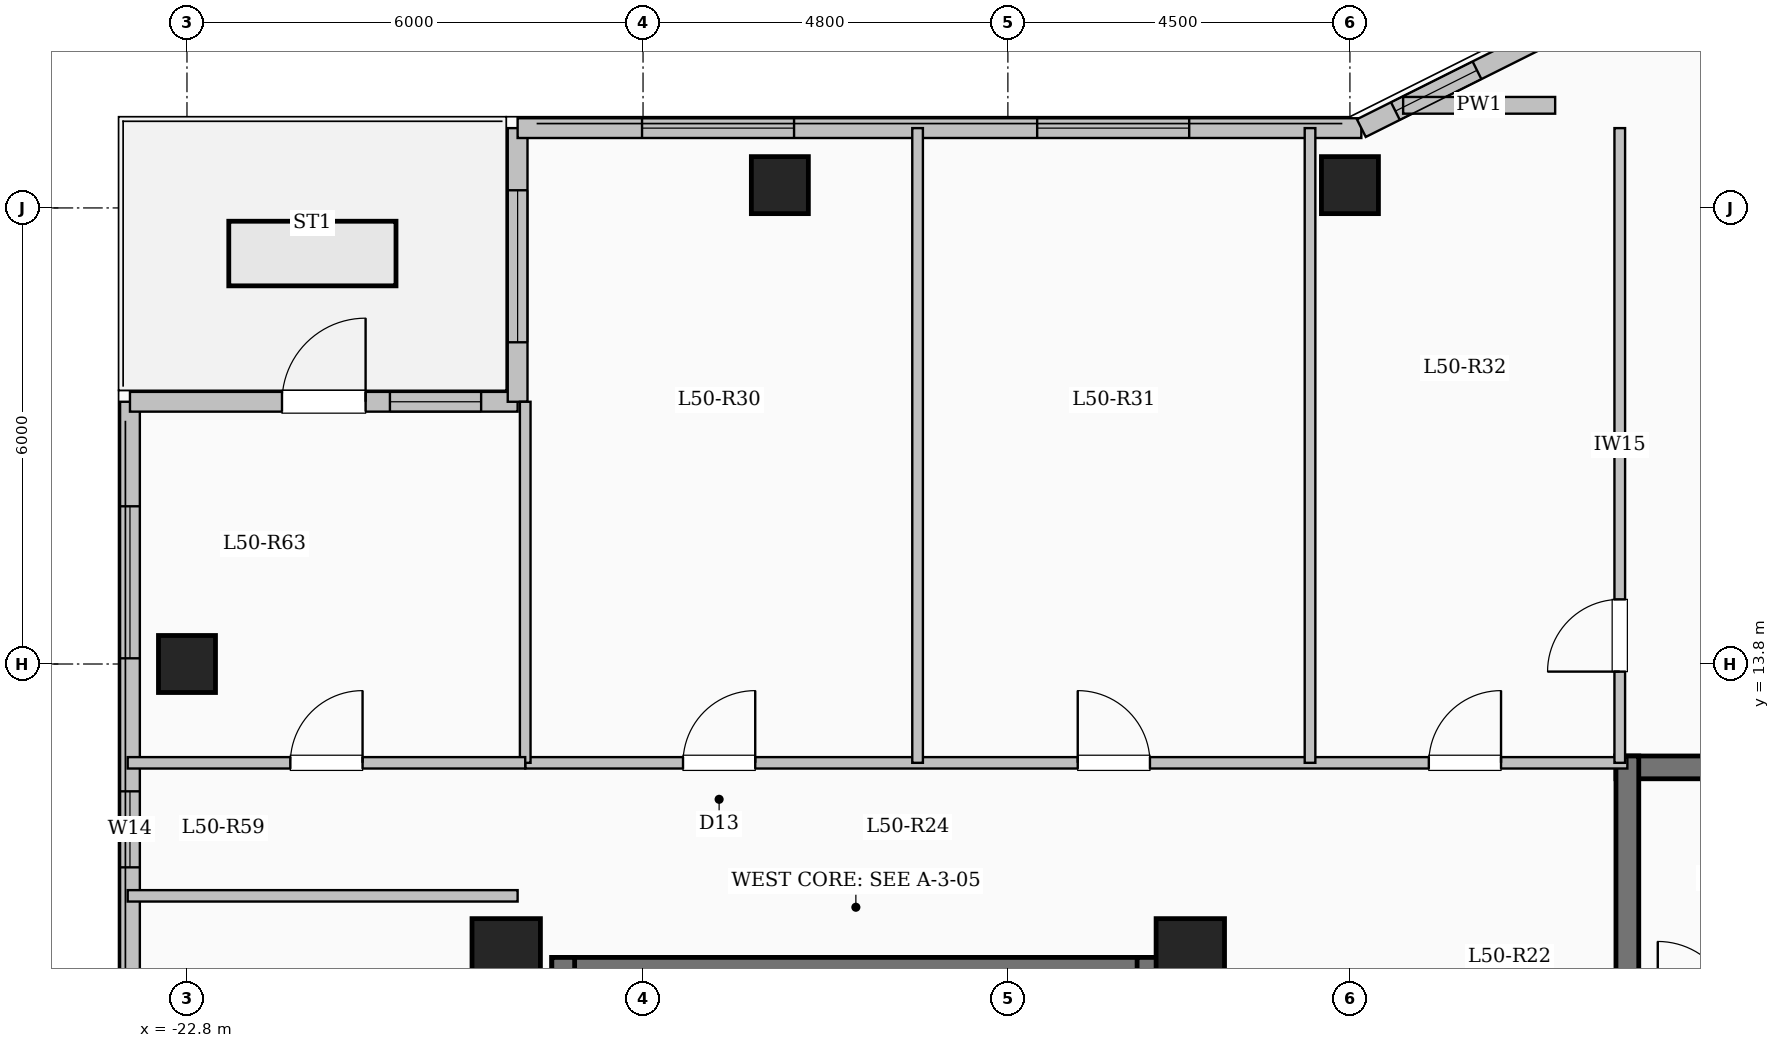
"""IFC4 building model, lengths in metres.
Left out: names, types, materials, properties, quantities, classifications, styles, units other than length and angle.
Written with IfcOpenShell. Run it as: python <this file> out.ifc"""

import sys

from ifc_helpers import new_model, si_unit, direction, frame, frame_2d, origin, origin_2d, place, context, subcontext, project, spatial, rectangle, extrude, element, fill, save


model = new_model("IFC4")
c1 = context("Model", 3, precision=1e-05, world=origin(), true_north=direction((0.0, 1.0)))
c2 = subcontext(c1, "Body", "Model", "MODEL_VIEW")
j1 = project(units=[si_unit("LENGTHUNIT", "METRE"), si_unit("PLANEANGLEUNIT", "RADIAN")], contexts=[c1])
p1 = place(None, origin())
s1 = spatial("IfcSite", under=j1, at=p1, CompositionType="ELEMENT")
p2 = place(p1, origin())
s2 = spatial("IfcBuilding", under=s1, at=p2, CompositionType="ELEMENT")
p3 = place(p2, frame((0.0, 0.0, 186.9)))
s3 = spatial("IfcBuildingStorey", under=s2, at=p3, CompositionType="ELEMENT", Elevation=186.9)
for number, where, z_axis, x_axis in (
    (1, (-9.6, 10.0, 0.0), (0.0, 0.0, 1.0), (1.0, 0.0, 0.0)),
    (2, (-18.6, 10.0, 0.0), (0.0, 0.0, 1.0), (1.0, 0.0, 0.0)),
):
    element("IfcColumn", number, at=place(p3, frame(where, z_axis=z_axis, x_axis=x_axis)), inside=s3, PredefinedType="COLUMN", context=c2, shape_type="SweptSolid", body=[
        extrude(rectangle(XDim=0.9, YDim=0.9, at=origin_2d()), origin(), (0.0, 0.0, 1.0), 3.35),
    ])
for number, where, z_axis, x_axis in (
    (3, (-15.0, 20.1, 0.0), (0.0, 0.0, 1.0), (1.0, 0.0, 0.0)),
    (4, (-7.5, 20.1, 0.0), (0.0, 0.0, 1.0), (1.0, 0.0, 0.0)),
    (5, (-22.8, 13.8, 0.0), (0.0, 0.0, 1.0), (1.0, 0.0, 0.0)),
):
    element("IfcColumn", number, at=place(p3, frame(where, z_axis=z_axis, x_axis=x_axis)), inside=s3, PredefinedType="COLUMN", context=c2, shape_type="SweptSolid", body=[
        extrude(rectangle(XDim=0.75, YDim=0.75, at=origin_2d()), origin(), (0.0, 0.0, 1.0), 3.35),
    ])
p4 = place(p3, frame((-23.55, -17.25, 0.0), z_axis=(0.0, 0.0, 1.0), x_axis=(0.0, 1.0, 0.0)))
e6 = element("IfcWall", 6, at=p4, inside=s3, PredefinedType="SOLIDWALL", context=c2, shape_type="SweptSolid", body=[
    extrude(rectangle(XDim=34.5, YDim=0.26, at=frame_2d((17.25, 0.0))), origin(), (0.0, 0.0, 1.0), 3.1),
])
p5 = place(p4, frame((2.825, 0.0, 0.9)))
e7 = element("IfcOpeningElement", 7, at=p5, cuts=e6, PredefinedType="OPENING", context=c2, shape_type="SweptSolid", body=[
    extrude(rectangle(XDim=2.2, YDim=1.75, at=frame_2d((1.1, 0.875))), frame((0.0, 0.14, 0.0), z_axis=(0.0, -1.0, 0.0), x_axis=(1.0, 0.0, 0.0)), (0.0, 0.0, 1.0), 0.28),
])
p6 = place(p4, frame((8.325, 0.0, 0.95)))
e8 = element("IfcOpeningElement", 8, at=p6, cuts=e6, PredefinedType="OPENING", context=c2, shape_type="SweptSolid", body=[
    extrude(rectangle(XDim=1.2, YDim=1.5, at=frame_2d((0.6, 0.75))), frame((0.0, 0.14, 0.0), z_axis=(0.0, -1.0, 0.0), x_axis=(1.0, 0.0, 0.0)), (0.0, 0.0, 1.0), 0.28),
])
p7 = place(p4, frame((18.0, 0.0, 0.9)))
e9 = element("IfcOpeningElement", 9, at=p7, cuts=e6, PredefinedType="OPENING", context=c2, shape_type="SweptSolid", body=[
    extrude(rectangle(XDim=2.0, YDim=1.7, at=frame_2d((1.0, 0.85))), frame((0.0, 0.14, 0.0), z_axis=(0.0, -1.0, 0.0), x_axis=(1.0, 0.0, 0.0)), (0.0, 0.0, 1.0), 0.28),
])
p8 = place(p4, frame((28.375, 0.0, 0.95)))
e10 = element("IfcOpeningElement", 10, at=p8, cuts=e6, PredefinedType="OPENING", context=c2, shape_type="SweptSolid", body=[
    extrude(rectangle(XDim=1.0, YDim=1.5, at=frame_2d((0.5, 0.75))), frame((0.0, 0.14, 0.0), z_axis=(0.0, -1.0, 0.0), x_axis=(1.0, 0.0, 0.0)), (0.0, 0.0, 1.0), 0.28),
])
p9 = place(p4, frame((31.125, 0.0, 0.9)))
e11 = element("IfcOpeningElement", 11, at=p9, cuts=e6, PredefinedType="OPENING", context=c2, shape_type="SweptSolid", body=[
    extrude(rectangle(XDim=2.0, YDim=1.7, at=frame_2d((1.0, 0.85))), frame((0.0, 0.14, 0.0), z_axis=(0.0, -1.0, 0.0), x_axis=(1.0, 0.0, 0.0)), (0.0, 0.0, 1.0), 0.28),
])
p10 = place(p3, frame((-23.55, 17.25, 0.0), z_axis=(0.0, 0.0, 1.0), x_axis=(1.0, 0.0, 0.0)))
e12 = element("IfcWall", 12, at=p10, inside=s3, PredefinedType="SOLIDWALL", context=c2, shape_type="SweptSolid", body=[
    extrude(rectangle(XDim=5.1, YDim=0.26, at=frame_2d((2.55, 0.0))), origin(), (0.0, 0.0, 1.0), 3.1),
])
p11 = place(p10, frame((2.0, 0.0, 0.0)))
e13 = element("IfcOpeningElement", 13, at=p11, cuts=e12, PredefinedType="OPENING", context=c2, shape_type="SweptSolid", body=[
    extrude(rectangle(XDim=1.1, YDim=2.2, at=frame_2d((0.55, 1.1))), frame((0.0, 0.14, 0.0), z_axis=(0.0, -1.0, 0.0), x_axis=(1.0, 0.0, 0.0)), (0.0, 0.0, 1.0), 0.28),
])
p12 = place(p10, frame((3.42, 0.0, 0.95)))
e14 = element("IfcOpeningElement", 14, at=p12, cuts=e12, PredefinedType="OPENING", context=c2, shape_type="SweptSolid", body=[
    extrude(rectangle(XDim=1.2, YDim=1.5, at=frame_2d((0.6, 0.75))), frame((0.0, 0.14, 0.0), z_axis=(0.0, -1.0, 0.0), x_axis=(1.0, 0.0, 0.0)), (0.0, 0.0, 1.0), 0.28),
])
p13 = place(p3, frame((-18.45, 17.25, 0.0), z_axis=(0.0, 0.0, 1.0), x_axis=(0.0, 1.0, 0.0)))
e15 = element("IfcWall", 15, at=p13, inside=s3, PredefinedType="SOLIDWALL", context=c2, shape_type="SweptSolid", body=[
    extrude(rectangle(XDim=3.6, YDim=0.26, at=frame_2d((1.8, 0.0))), origin(), (0.0, 0.0, 1.0), 3.1),
])
p14 = place(p13, frame((0.782, 0.0, 0.9)))
e16 = element("IfcOpeningElement", 16, at=p14, cuts=e15, PredefinedType="OPENING", context=c2, shape_type="SweptSolid", body=[
    extrude(rectangle(XDim=2.0, YDim=1.7, at=frame_2d((1.0, 0.85))), frame((0.0, 0.14, 0.0), z_axis=(0.0, -1.0, 0.0), x_axis=(1.0, 0.0, 0.0)), (0.0, 0.0, 1.0), 0.28),
])
p15 = place(p3, frame((-18.45, 20.85, 0.0), z_axis=(0.0, 0.0, 1.0), x_axis=(1.0, 0.0, 0.0)))
e17 = element("IfcWall", 17, at=p15, inside=s3, PredefinedType="SOLIDWALL", context=c2, shape_type="SweptSolid", body=[
    extrude(rectangle(XDim=11.1, YDim=0.26, at=frame_2d((5.55, 0.0))), origin(), (0.0, 0.0, 1.0), 3.1),
])
p16 = place(p15, frame((1.637, 0.0, 0.9)))
e18 = element("IfcOpeningElement", 18, at=p16, cuts=e17, PredefinedType="OPENING", context=c2, shape_type="SweptSolid", body=[
    extrude(rectangle(XDim=2.0, YDim=1.7, at=frame_2d((1.0, 0.85))), frame((0.0, 0.14, 0.0), z_axis=(0.0, -1.0, 0.0), x_axis=(1.0, 0.0, 0.0)), (0.0, 0.0, 1.0), 0.28),
])
p17 = place(p15, frame((6.835, 0.0, 0.9)))
e19 = element("IfcOpeningElement", 19, at=p17, cuts=e17, PredefinedType="OPENING", context=c2, shape_type="SweptSolid", body=[
    extrude(rectangle(XDim=2.0, YDim=1.7, at=frame_2d((1.0, 0.85))), frame((0.0, 0.14, 0.0), z_axis=(0.0, -1.0, 0.0), x_axis=(1.0, 0.0, 0.0)), (0.0, 0.0, 1.0), 0.28),
])
p18 = place(p3, frame((-7.35, 20.85, 0.0), z_axis=(0.0, 0.0, 1.0), x_axis=(0.894427191, 0.4472135955, 0.0)))
e20 = element("IfcWall", 20, at=p18, inside=s3, PredefinedType="SOLIDWALL", context=c2, shape_type="SweptSolid", body=[
    extrude(rectangle(XDim=3.354, YDim=0.26, at=frame_2d((1.677, 0.0))), origin(), (0.0, 0.0, 1.0), 3.1),
])
p19 = place(p18, frame((0.501, 0.0, 0.95)))
e21 = element("IfcOpeningElement", 21, at=p19, cuts=e20, PredefinedType="OPENING", context=c2, shape_type="SweptSolid", body=[
    extrude(rectangle(XDim=1.2, YDim=1.5, at=frame_2d((0.6, 0.75))), frame((0.0, 0.14, 0.0), z_axis=(0.0, -1.0, 0.0), x_axis=(1.0, 0.0, 0.0)), (0.0, 0.0, 1.0), 0.28),
])
p20 = place(p3, frame((-6.8, 21.15, 0.0), z_axis=(0.0, 0.0, 1.0), x_axis=(1.0, 0.0, 0.0)))
e22 = element("IfcWall", 22, at=p20, inside=s3, PredefinedType="PARAPET", context=c2, shape_type="SweptSolid", body=[
    extrude(rectangle(XDim=2.0, YDim=0.22, at=frame_2d((1.0, 0.0))), origin(), (0.0, 0.0, 1.0), 0.85),
])
p21 = place(p3, frame((-18.0, 9.79, 0.0), z_axis=(0.0, 0.0, 1.0), x_axis=(1.0, 0.0, 0.0)))
e23 = element("IfcWall", 23, at=p21, inside=s3, PredefinedType="SHEAR", context=c2, shape_type="SweptSolid", body=[
    extrude(rectangle(XDim=8.0, YDim=0.3, at=frame_2d((4.0, 0.0))), origin(), (0.0, 0.0, 1.0), 3.35),
])
for number, where, z_axis, x_axis in (
    (24, (-17.85, 6.35, 0.0), (0.0, 0.0, 1.0), (0.0, 1.0, 0.0)),
    (25, (-10.15, 6.35, 0.0), (0.0, 0.0, 1.0), (0.0, 1.0, 0.0)),
):
    element("IfcWall", number, at=place(p3, frame(where, z_axis=z_axis, x_axis=x_axis)), inside=s3, PredefinedType="SHEAR", context=c2, shape_type="SweptSolid", body=[
        extrude(rectangle(XDim=3.59, YDim=0.3, at=frame_2d((1.795, 0.0))), origin(), (0.0, 0.0, 1.0), 3.35),
    ])
p22 = place(p3, frame((-4.0, 12.44, 0.0), z_axis=(0.0, 0.0, 1.0), x_axis=(1.0, 0.0, 0.0)))
e26 = element("IfcWall", 26, at=p22, inside=s3, PredefinedType="SHEAR", context=c2, shape_type="SweptSolid", body=[
    extrude(rectangle(XDim=8.0, YDim=0.3, at=frame_2d((4.0, 0.0))), origin(), (0.0, 0.0, 1.0), 3.35),
])
p23 = place(p3, frame((-3.85, 9.0, 0.0), z_axis=(0.0, 0.0, 1.0), x_axis=(0.0, 1.0, 0.0)))
e27 = element("IfcWall", 27, at=p23, inside=s3, PredefinedType="SHEAR", context=c2, shape_type="SweptSolid", body=[
    extrude(rectangle(XDim=3.59, YDim=0.3, at=frame_2d((1.795, 0.0))), origin(), (0.0, 0.0, 1.0), 3.35),
])
p24 = place(p3, frame((-18.35, 12.5, 0.0), z_axis=(0.0, 0.0, 1.0), x_axis=(1.0, 0.0, 0.0)))
e28 = element("IfcWall", 28, at=p24, inside=s3, PredefinedType="PARTITIONING", context=c2, shape_type="SweptSolid", body=[
    extrude(rectangle(XDim=14.5, YDim=0.15, at=frame_2d((7.25, 0.0))), origin(), (0.0, 0.0, 1.0), 3.1),
])
p25 = place(p24, frame((2.076, 0.0, 0.0)))
e29 = element("IfcOpeningElement", 29, at=p25, cuts=e28, PredefinedType="OPENING", context=c2, shape_type="SweptSolid", body=[
    extrude(rectangle(XDim=0.95, YDim=2.15, at=frame_2d((0.475, 1.075))), frame((0.0, 0.085, 0.0), z_axis=(0.0, -1.0, 0.0), x_axis=(1.0, 0.0, 0.0)), (0.0, 0.0, 1.0), 0.17),
])
p26 = place(p24, frame((7.269, 0.0, 0.0)))
e30 = element("IfcOpeningElement", 30, at=p26, cuts=e28, PredefinedType="OPENING", context=c2, shape_type="SweptSolid", body=[
    extrude(rectangle(XDim=0.95, YDim=2.15, at=frame_2d((0.475, 1.075))), frame((0.0, 0.085, 0.0), z_axis=(0.0, -1.0, 0.0), x_axis=(1.0, 0.0, 0.0)), (0.0, 0.0, 1.0), 0.17),
])
p27 = place(p24, frame((11.888, 0.0, 0.0)))
e31 = element("IfcOpeningElement", 31, at=p27, cuts=e28, PredefinedType="OPENING", context=c2, shape_type="SweptSolid", body=[
    extrude(rectangle(XDim=0.95, YDim=2.15, at=frame_2d((0.475, 1.075))), frame((0.0, 0.085, 0.0), z_axis=(0.0, -1.0, 0.0), x_axis=(1.0, 0.0, 0.0)), (0.0, 0.0, 1.0), 0.17),
])
p28 = place(p3, frame((-3.95, 12.5, 0.0), z_axis=(0.0, 0.0, 1.0), x_axis=(0.0, 1.0, 0.0)))
e32 = element("IfcWall", 32, at=p28, inside=s3, PredefinedType="PARTITIONING", context=c2, shape_type="SweptSolid", body=[
    extrude(rectangle(XDim=8.35, YDim=0.14, at=frame_2d((4.175, 0.0))), origin(), (0.0, 0.0, 1.0), 3.1),
])
p29 = place(p28, frame((1.2, 0.0, 0.0)))
e33 = element("IfcOpeningElement", 33, at=p29, cuts=e32, PredefinedType="OPENING", context=c2, shape_type="SweptSolid", body=[
    extrude(rectangle(XDim=0.95, YDim=2.15, at=frame_2d((0.475, 1.075))), frame((0.0, 0.08, 0.0), z_axis=(0.0, -1.0, 0.0), x_axis=(1.0, 0.0, 0.0)), (0.0, 0.0, 1.0), 0.16),
])
p30 = place(p3, frame((-13.188, 12.5, 0.0), z_axis=(0.0, 0.0, 1.0), x_axis=(0.0, 1.0, 0.0)))
e34 = element("IfcWall", 34, at=p30, inside=s3, PredefinedType="PARTITIONING", context=c2, shape_type="SweptSolid", body=[
    extrude(rectangle(XDim=8.35, YDim=0.14, at=frame_2d((4.175, 0.0))), origin(), (0.0, 0.0, 1.0), 3.1),
])
p31 = place(p3, frame((-8.025, 12.5, 0.0), z_axis=(0.0, 0.0, 1.0), x_axis=(0.0, 1.0, 0.0)))
e35 = element("IfcWall", 35, at=p31, inside=s3, PredefinedType="PARTITIONING", context=c2, shape_type="SweptSolid", body=[
    extrude(rectangle(XDim=8.35, YDim=0.14, at=frame_2d((4.175, 0.0))), origin(), (0.0, 0.0, 1.0), 2.585),
])
p32 = place(p3, frame((-23.58, 10.75, 0.0), z_axis=(0.0, 0.0, 1.0), x_axis=(1.0, 0.0, 0.0)))
e36 = element("IfcWall", 36, at=p32, inside=s3, PredefinedType="PARTITIONING", context=c2, shape_type="SweptSolid", body=[
    extrude(rectangle(XDim=5.13, YDim=0.15, at=frame_2d((2.565, 0.0))), origin(), (0.0, 0.0, 1.0), 3.1),
])
p33 = place(p3, frame((-18.35, 12.5, 0.0), z_axis=(0.0, 0.0, 1.0), x_axis=(0.0, 1.0, 0.0)))
e37 = element("IfcWall", 37, at=p33, inside=s3, PredefinedType="PARTITIONING", context=c2, shape_type="SweptSolid", body=[
    extrude(rectangle(XDim=4.75, YDim=0.14, at=frame_2d((2.375, 0.0))), origin(), (0.0, 0.0, 1.0), 3.1),
])
p34 = place(p3, frame((-23.58, 12.5, 0.0), z_axis=(0.0, 0.0, 1.0), x_axis=(1.0, 0.0, 0.0)))
e38 = element("IfcWall", 38, at=p34, inside=s3, PredefinedType="PARTITIONING", context=c2, shape_type="SweptSolid", body=[
    extrude(rectangle(XDim=5.23, YDim=0.15, at=frame_2d((2.615, 0.0))), origin(), (0.0, 0.0, 1.0), 3.1),
])
p35 = place(p34, frame((2.14, 0.0, 0.0)))
e39 = element("IfcOpeningElement", 39, at=p35, cuts=e38, PredefinedType="OPENING", context=c2, shape_type="SweptSolid", body=[
    extrude(rectangle(XDim=0.95, YDim=2.15, at=frame_2d((0.475, 1.075))), frame((0.0, 0.085, 0.0), z_axis=(0.0, -1.0, 0.0), x_axis=(1.0, 0.0, 0.0)), (0.0, 0.0, 1.0), 0.17),
])
p36 = place(p8, origin())
e40 = element("IfcWindow", 40, at=p36, inside=s3, PartitioningType="SINGLE_PANEL", PredefinedType="WINDOW", context=c2, shape_type="SweptSolid", body=[
    extrude(rectangle(XDim=1.0, YDim=1.5, at=frame_2d((0.5, 0.75))), frame((0.0, 0.03, 0.0), z_axis=(0.0, -1.0, 0.0), x_axis=(1.0, 0.0, 0.0)), (0.0, 0.0, 1.0), 0.06),
])
fill(e10, e40)
p37 = place(p9, origin())
e41 = element("IfcWindow", 41, at=p37, inside=s3, PartitioningType="SINGLE_PANEL", PredefinedType="WINDOW", context=c2, shape_type="SweptSolid", body=[
    extrude(rectangle(XDim=2.0, YDim=1.7, at=frame_2d((1.0, 0.85))), frame((0.0, 0.03, 0.0), z_axis=(0.0, -1.0, 0.0), x_axis=(1.0, 0.0, 0.0)), (0.0, 0.0, 1.0), 0.06),
])
fill(e11, e41)
p38 = place(p11, origin())
e42 = element("IfcDoor", 42, at=p38, inside=s3, OperationType="SINGLE_SWING_RIGHT", PredefinedType="DOOR", context=c2, shape_type="SweptSolid", body=[
    extrude(rectangle(XDim=1.1, YDim=2.2, at=frame_2d((0.55, 1.1))), frame((0.0, 0.025, 0.0), z_axis=(0.0, -1.0, 0.0), x_axis=(1.0, 0.0, 0.0)), (0.0, 0.0, 1.0), 0.05),
])
fill(e13, e42)
p39 = place(p12, origin())
e43 = element("IfcWindow", 43, at=p39, inside=s3, PartitioningType="SINGLE_PANEL", PredefinedType="WINDOW", context=c2, shape_type="SweptSolid", body=[
    extrude(rectangle(XDim=1.2, YDim=1.5, at=frame_2d((0.6, 0.75))), frame((0.0, 0.03, 0.0), z_axis=(0.0, -1.0, 0.0), x_axis=(1.0, 0.0, 0.0)), (0.0, 0.0, 1.0), 0.06),
])
fill(e14, e43)
p40 = place(p14, origin())
e44 = element("IfcWindow", 44, at=p40, inside=s3, PartitioningType="SINGLE_PANEL", PredefinedType="WINDOW", context=c2, shape_type="SweptSolid", body=[
    extrude(rectangle(XDim=2.0, YDim=1.7, at=frame_2d((1.0, 0.85))), frame((0.0, 0.03, 0.0), z_axis=(0.0, -1.0, 0.0), x_axis=(1.0, 0.0, 0.0)), (0.0, 0.0, 1.0), 0.06),
])
fill(e16, e44)
p41 = place(p16, origin())
e45 = element("IfcWindow", 45, at=p41, inside=s3, PartitioningType="SINGLE_PANEL", PredefinedType="WINDOW", context=c2, shape_type="SweptSolid", body=[
    extrude(rectangle(XDim=2.0, YDim=1.7, at=frame_2d((1.0, 0.85))), frame((0.0, 0.03, 0.0), z_axis=(0.0, -1.0, 0.0), x_axis=(1.0, 0.0, 0.0)), (0.0, 0.0, 1.0), 0.06),
])
fill(e18, e45)
p42 = place(p17, origin())
e46 = element("IfcWindow", 46, at=p42, inside=s3, PartitioningType="SINGLE_PANEL", PredefinedType="WINDOW", context=c2, shape_type="SweptSolid", body=[
    extrude(rectangle(XDim=2.0, YDim=1.7, at=frame_2d((1.0, 0.85))), frame((0.0, 0.03, 0.0), z_axis=(0.0, -1.0, 0.0), x_axis=(1.0, 0.0, 0.0)), (0.0, 0.0, 1.0), 0.06),
])
fill(e19, e46)
p43 = place(p19, origin())
e47 = element("IfcWindow", 47, at=p43, inside=s3, PartitioningType="SINGLE_PANEL", PredefinedType="WINDOW", context=c2, shape_type="SweptSolid", body=[
    extrude(rectangle(XDim=1.2, YDim=1.5, at=frame_2d((0.6, 0.75))), frame((0.0, 0.03, 0.0), z_axis=(0.0, -1.0, 0.0), x_axis=(1.0, 0.0, 0.0)), (0.0, 0.0, 1.0), 0.06),
])
fill(e21, e47)
p44 = place(p25, origin())
e48 = element("IfcDoor", 48, at=p44, inside=s3, OperationType="SINGLE_SWING_RIGHT", PredefinedType="DOOR", context=c2, shape_type="SweptSolid", body=[
    extrude(rectangle(XDim=0.95, YDim=2.15, at=frame_2d((0.475, 1.075))), frame((0.0, 0.025, 0.0), z_axis=(0.0, -1.0, 0.0), x_axis=(1.0, 0.0, 0.0)), (0.0, 0.0, 1.0), 0.05),
])
fill(e29, e48)
p45 = place(p26, origin())
e49 = element("IfcDoor", 49, at=p45, inside=s3, OperationType="SINGLE_SWING_LEFT", PredefinedType="DOOR", context=c2, shape_type="SweptSolid", body=[
    extrude(rectangle(XDim=0.95, YDim=2.15, at=frame_2d((0.475, 1.075))), frame((0.0, 0.025, 0.0), z_axis=(0.0, -1.0, 0.0), x_axis=(1.0, 0.0, 0.0)), (0.0, 0.0, 1.0), 0.05),
])
fill(e30, e49)
p46 = place(p27, origin())
e50 = element("IfcDoor", 50, at=p46, inside=s3, OperationType="SINGLE_SWING_RIGHT", PredefinedType="DOOR", context=c2, shape_type="SweptSolid", body=[
    extrude(rectangle(XDim=0.95, YDim=2.15, at=frame_2d((0.475, 1.075))), frame((0.0, 0.025, 0.0), z_axis=(0.0, -1.0, 0.0), x_axis=(1.0, 0.0, 0.0)), (0.0, 0.0, 1.0), 0.05),
])
fill(e31, e50)
p47 = place(p29, origin())
e51 = element("IfcDoor", 51, at=p47, inside=s3, OperationType="SINGLE_SWING_LEFT", PredefinedType="DOOR", context=c2, shape_type="SweptSolid", body=[
    extrude(rectangle(XDim=0.95, YDim=2.15, at=frame_2d((0.475, 1.075))), frame((0.0, 0.025, 0.0), z_axis=(0.0, -1.0, 0.0), x_axis=(1.0, 0.0, 0.0)), (0.0, 0.0, 1.0), 0.05),
])
fill(e33, e51)
p48 = place(p35, origin())
e52 = element("IfcDoor", 52, at=p48, inside=s3, OperationType="SINGLE_SWING_RIGHT", PredefinedType="DOOR", context=c2, shape_type="SweptSolid", body=[
    extrude(rectangle(XDim=0.95, YDim=2.15, at=frame_2d((0.475, 1.075))), frame((0.0, 0.025, 0.0), z_axis=(0.0, -1.0, 0.0), x_axis=(1.0, 0.0, 0.0)), (0.0, 0.0, 1.0), 0.05),
])
fill(e39, e52)
save(model, sys.argv[1])
